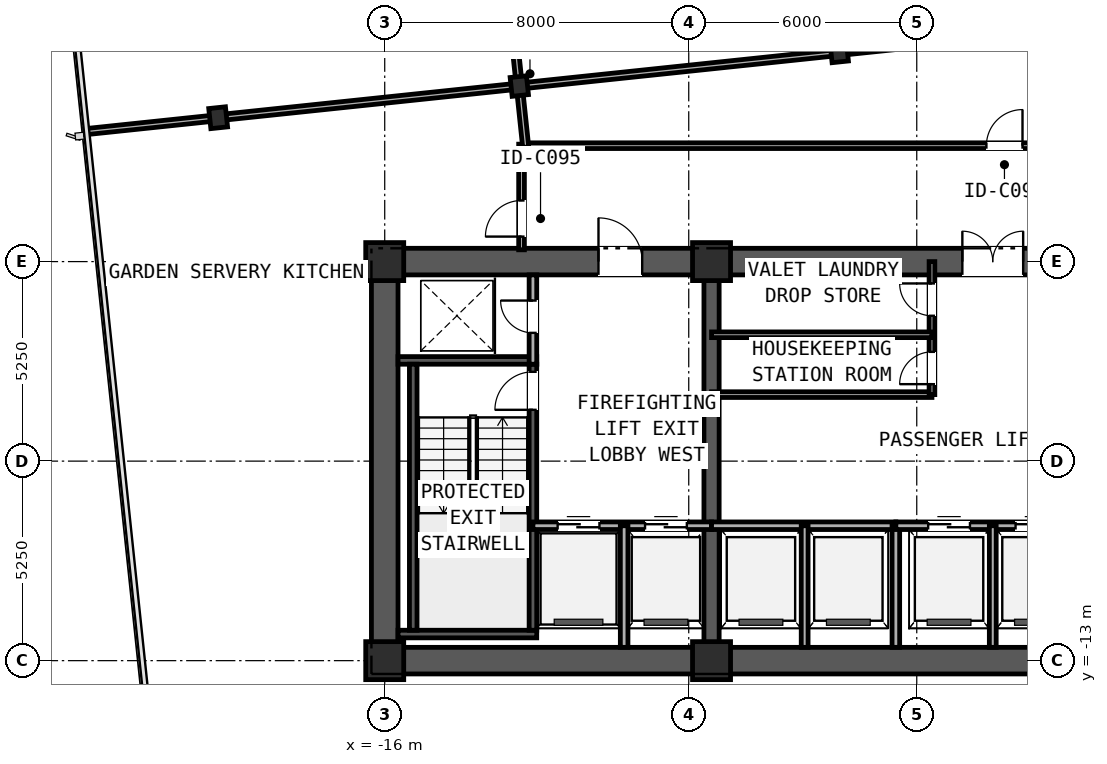
"""IFC4 building model, lengths in metres.
Left out: names, types, materials, properties, quantities, classifications, styles, units other than length and angle.
Written with IfcOpenShell. Run it as: python <this file> out.ifc"""

import sys

from ifc_helpers import new_model, si_unit, direction, frame, frame_2d, origin, origin_2d, place, context, subcontext, project, spatial, rectangle, i_section, extrude, element, fill, save


model = new_model("IFC4")
c1 = context("Model", 3, precision=1e-05, world=origin(), true_north=direction((0.0, 1.0)))
c2 = subcontext(c1, "Body", "Model", "MODEL_VIEW")
j1 = project(units=[si_unit("LENGTHUNIT", "METRE"), si_unit("PLANEANGLEUNIT", "RADIAN")], contexts=[c1])
p1 = place(None, origin())
s1 = spatial("IfcSite", under=j1, at=p1, CompositionType="ELEMENT")
p2 = place(p1, origin())
s2 = spatial("IfcBuilding", under=s1, at=p2, CompositionType="ELEMENT")
p3 = place(p2, frame((0.0, 0.0, 106.35)))
s3 = spatial("IfcBuildingStorey", under=s2, at=p3, CompositionType="ELEMENT", Elevation=106.35)
p4 = place(p3, frame((-16.35, -13.0, 0.0), z_axis=(0.0, 0.0, 1.0), x_axis=(1.0, 0.0, 0.0)))
e1 = element("IfcWall", 1, at=p4, inside=s3, PredefinedType="SHEAR", context=c2, shape_type="SweptSolid", body=[
    extrude(rectangle(XDim=32.7, YDim=0.7, at=frame_2d((16.35, 0.0))), origin(), (0.0, 0.0, 1.0), 2.91),
])
p5 = place(p3, frame((-16.35, -2.5, 0.0), z_axis=(0.0, 0.0, 1.0), x_axis=(1.0, 0.0, 0.0)))
e2 = element("IfcWall", 2, at=p5, inside=s3, PredefinedType="SHEAR", context=c2, shape_type="SweptSolid", body=[
    extrude(rectangle(XDim=32.7, YDim=0.7, at=frame_2d((16.35, 0.0))), origin(), (0.0, 0.0, 1.0), 2.91),
])
p6 = place(p5, frame((5.975, 0.0, 0.0)))
e3 = element("IfcOpeningElement", 3, at=p6, cuts=e2, PredefinedType="OPENING", context=c2, shape_type="SweptSolid", body=[
    extrude(rectangle(XDim=1.15, YDim=2.0, at=frame_2d((0.575, 1.0))), frame((0.0, 0.36, 0.0), z_axis=(0.0, -1.0, 0.0), x_axis=(1.0, 0.0, 0.0)), (0.0, 0.0, 1.0), 0.72),
])
p7 = place(p5, frame((15.55, 0.0, 0.0)))
e4 = element("IfcOpeningElement", 4, at=p7, cuts=e2, PredefinedType="OPENING", context=c2, shape_type="SweptSolid", body=[
    extrude(rectangle(XDim=1.6, YDim=2.0, at=frame_2d((0.8, 1.0))), frame((0.0, 0.36, 0.0), z_axis=(0.0, -1.0, 0.0), x_axis=(1.0, 0.0, 0.0)), (0.0, 0.0, 1.0), 0.72),
])
p8 = place(p5, frame((25.575, 0.0, 0.0)))
e5 = element("IfcOpeningElement", 5, at=p8, cuts=e2, PredefinedType="OPENING", context=c2, shape_type="SweptSolid", body=[
    extrude(rectangle(XDim=1.15, YDim=2.0, at=frame_2d((0.575, 1.0))), frame((0.0, 0.36, 0.0), z_axis=(0.0, -1.0, 0.0), x_axis=(1.0, 0.0, 0.0)), (0.0, 0.0, 1.0), 0.72),
])
p9 = place(p3, frame((-16.0, -12.65, 0.0), z_axis=(0.0, 0.0, 1.0), x_axis=(0.0, 1.0, 0.0)))
e6 = element("IfcWall", 6, at=p9, inside=s3, PredefinedType="SHEAR", context=c2, shape_type="SweptSolid", body=[
    extrude(rectangle(XDim=9.8, YDim=0.7, at=frame_2d((4.9, 0.0))), origin(), (0.0, 0.0, 1.0), 2.91),
])
p10 = place(p3, frame((-7.4, -12.65, 0.0), z_axis=(0.0, 0.0, 1.0), x_axis=(0.0, 1.0, 0.0)))
e7 = element("IfcWall", 7, at=p10, inside=s3, PredefinedType="SHEAR", context=c2, shape_type="SweptSolid", body=[
    extrude(rectangle(XDim=9.8, YDim=0.4, at=frame_2d((4.9, 0.0))), origin(), (0.0, 0.0, 1.0), 3.19),
])
for number, where, z_axis, x_axis in (
    (8, (-15.65, -12.3, 0.0), (0.0, 0.0, 1.0), (1.0, 0.0, 0.0)),
    (9, (-15.65, -5.1, 0.0), (0.0, 0.0, 1.0), (1.0, 0.0, 0.0)),
):
    element("IfcWall", number, at=place(p3, frame(where, z_axis=z_axis, x_axis=x_axis)), inside=s3, PredefinedType="SOLIDWALL", context=c2, shape_type="SweptSolid", body=[
        extrude(rectangle(XDim=3.65, YDim=0.2, at=frame_2d((1.825, 0.0))), origin(), (0.0, 0.0, 1.0), 3.19),
    ])
p11 = place(p3, frame((-15.25, -12.2, 0.0), z_axis=(0.0, 0.0, 1.0), x_axis=(0.0, 1.0, 0.0)))
e10 = element("IfcWall", 10, at=p11, inside=s3, PredefinedType="SOLIDWALL", context=c2, shape_type="SweptSolid", body=[
    extrude(rectangle(XDim=7.0, YDim=0.2, at=frame_2d((3.5, 0.0))), origin(), (0.0, 0.0, 1.0), 3.19),
])
p12 = place(p3, frame((-12.1, -12.2, 0.0), z_axis=(0.0, 0.0, 1.0), x_axis=(0.0, 1.0, 0.0)))
e11 = element("IfcWall", 11, at=p12, inside=s3, PredefinedType="SOLIDWALL", context=c2, shape_type="SweptSolid", body=[
    extrude(rectangle(XDim=7.0, YDim=0.2, at=frame_2d((3.5, 0.0))), origin(), (0.0, 0.0, 1.0), 3.19),
])
p13 = place(p12, frame((5.8, 0.0, 0.0)))
e12 = element("IfcOpeningElement", 12, at=p13, cuts=e11, PredefinedType="OPENING", context=c2, shape_type="SweptSolid", body=[
    extrude(rectangle(XDim=1.0, YDim=2.1, at=frame_2d((0.5, 1.05))), frame((0.0, 0.11, 0.0), z_axis=(0.0, -1.0, 0.0), x_axis=(1.0, 0.0, 0.0)), (0.0, 0.0, 1.0), 0.22),
])
for number, where, z_axis, x_axis in (
    (13, (-16.0, -13.0, 0.0), (0.0, 0.0, 1.0), (1.0, 0.0, 0.0)),
    (14, (-7.4, -13.0, 0.0), (0.0, 0.0, 1.0), (1.0, 0.0, 0.0)),
    (15, (-16.0, -2.5, 0.0), (0.0, 0.0, 1.0), (1.0, 0.0, 0.0)),
    (16, (-7.4, -2.5, 0.0), (0.0, 0.0, 1.0), (1.0, 0.0, 0.0)),
):
    element("IfcColumn", number, at=place(p3, frame(where, z_axis=z_axis, x_axis=x_axis)), inside=s3, PredefinedType="COLUMN", context=c2, shape_type="SweptSolid", body=[
        extrude(rectangle(XDim=1.0, YDim=1.0, at=origin_2d()), origin(), (0.0, 0.0, 1.0), 3.45),
    ])
p14 = place(p3, frame((-20.383, 1.286, 0.0), z_axis=(0.0, 0.0, 1.0), x_axis=(0.994521895368, 0.104528463268, 0.0)))
e17 = element("IfcColumn", 17, at=p14, inside=s3, PredefinedType="COLUMN", context=c2, shape_type="SweptSolid", body=[
    extrude(i_section(OverallWidth=0.442, OverallDepth=0.531, WebThickness=0.066, FlangeThickness=0.106, FilletRadius=0.031, at=origin_2d()), origin(), (0.0, 0.0, 1.0), 3.45),
])
for number, where, z_axis, x_axis in (
    (18, (-12.459, 2.119, 0.0), (0.0, 0.0, 1.0), (0.995, 0.105, 0.0)),
    (19, (-4.039, 3.004, 0.0), (0.0, 0.0, 1.0), (0.995, 0.105, 0.0)),
):
    element("IfcColumn", number, at=place(p3, frame(where, z_axis=z_axis, x_axis=x_axis)), inside=s3, PredefinedType="COLUMN", context=c2, shape_type="SweptSolid", body=[
        extrude(i_section(OverallWidth=0.432, OverallDepth=0.498, WebThickness=0.056, FlangeThickness=0.089, FilletRadius=0.031, at=origin_2d()), origin(), (0.0, 0.0, 1.0), 3.45),
    ])
p15 = place(p3, frame((-12.1, -5.2, 0.0), z_axis=(0.0, 0.0, 1.0), x_axis=(0.0, 1.0, 0.0)))
e20 = element("IfcWall", 20, at=p15, inside=s3, PredefinedType="PARTITIONING", context=c2, shape_type="SweptSolid", body=[
    extrude(rectangle(XDim=2.35, YDim=0.2, at=frame_2d((1.175, 0.0))), origin(), (0.0, 0.0, 1.0), 2.225),
])
p16 = place(p15, frame((0.825, 0.0, 0.0)))
e21 = element("IfcOpeningElement", 21, at=p16, cuts=e20, PredefinedType="OPENING", context=c2, shape_type="SweptSolid", body=[
    extrude(rectangle(XDim=0.85, YDim=2.05, at=frame_2d((0.425, 1.025))), frame((0.0, 0.11, 0.0), z_axis=(0.0, -1.0, 0.0), x_axis=(1.0, 0.0, 0.0)), (0.0, 0.0, 1.0), 0.22),
])
p17 = place(p3, frame((-12.1, -9.45, 0.0), z_axis=(0.0, 0.0, 1.0), x_axis=(1.0, 0.0, 0.0)))
e22 = element("IfcWall", 22, at=p17, inside=s3, PredefinedType="PARTITIONING", context=c2, shape_type="SweptSolid", body=[
    extrude(rectangle(XDim=4.7, YDim=0.2, at=frame_2d((2.35, 0.0))), origin(), (0.0, 0.0, 1.0), 3.19),
])
p18 = place(p17, frame((0.65, 0.0, 0.0)))
e23 = element("IfcOpeningElement", 23, at=p18, cuts=e22, PredefinedType="OPENING", context=c2, shape_type="SweptSolid", body=[
    extrude(rectangle(XDim=1.1, YDim=2.2, at=frame_2d((0.55, 1.1))), frame((0.0, 0.11, 0.0), z_axis=(0.0, -1.0, 0.0), x_axis=(1.0, 0.0, 0.0)), (0.0, 0.0, 1.0), 0.22),
])
p19 = place(p17, frame((2.95, 0.0, 0.0)))
e24 = element("IfcOpeningElement", 24, at=p19, cuts=e22, PredefinedType="OPENING", context=c2, shape_type="SweptSolid", body=[
    extrude(rectangle(XDim=1.1, YDim=2.2, at=frame_2d((0.55, 1.1))), frame((0.0, 0.11, 0.0), z_axis=(0.0, -1.0, 0.0), x_axis=(1.0, 0.0, 0.0)), (0.0, 0.0, 1.0), 0.22),
])
p20 = place(p3, frame((-9.7, -12.65, 0.0), z_axis=(0.0, 0.0, 1.0), x_axis=(0.0, 1.0, 0.0)))
e25 = element("IfcWall", 25, at=p20, inside=s3, PredefinedType="PARTITIONING", context=c2, shape_type="SweptSolid", body=[
    extrude(rectangle(XDim=3.2, YDim=0.2, at=frame_2d((1.6, 0.0))), origin(), (0.0, 0.0, 1.0), 2.225),
])
p21 = place(p3, frame((-7.4, -9.45, 0.0), z_axis=(0.0, 0.0, 1.0), x_axis=(1.0, 0.0, 0.0)))
e26 = element("IfcWall", 26, at=p21, inside=s3, PredefinedType="PARTITIONING", context=c2, shape_type="SweptSolid", body=[
    extrude(rectangle(XDim=4.85, YDim=0.2, at=frame_2d((2.425, 0.0))), origin(), (0.0, 0.0, 1.0), 3.19),
])
p22 = place(p3, frame((-4.95, -12.65, 0.0), z_axis=(0.0, 0.0, 1.0), x_axis=(0.0, 1.0, 0.0)))
e27 = element("IfcWall", 27, at=p22, inside=s3, PredefinedType="PARTITIONING", context=c2, shape_type="SweptSolid", body=[
    extrude(rectangle(XDim=3.2, YDim=0.18, at=frame_2d((1.6, 0.0))), origin(), (0.0, 0.0, 1.0), 2.225),
])
p23 = place(p3, frame((-2.55, -12.65, 0.0), z_axis=(0.0, 0.0, 1.0), x_axis=(0.0, 1.0, 0.0)))
e28 = element("IfcWall", 28, at=p23, inside=s3, PredefinedType="PARTITIONING", context=c2, shape_type="SweptSolid", body=[
    extrude(rectangle(XDim=3.2, YDim=0.2, at=frame_2d((1.6, 0.0))), origin(), (0.0, 0.0, 1.0), 2.225),
])
p24 = place(p3, frame((-2.55, -9.45, 0.0), z_axis=(0.0, 0.0, 1.0), x_axis=(1.0, 0.0, 0.0)))
e29 = element("IfcWall", 29, at=p24, inside=s3, PredefinedType="PARTITIONING", context=c2, shape_type="SweptSolid", body=[
    extrude(rectangle(XDim=5.1, YDim=0.2, at=frame_2d((2.55, 0.0))), origin(), (0.0, 0.0, 1.0), 3.19),
])
p25 = place(p24, frame((0.85, 0.0, 0.0)))
e30 = element("IfcOpeningElement", 30, at=p25, cuts=e29, PredefinedType="OPENING", context=c2, shape_type="SweptSolid", body=[
    extrude(rectangle(XDim=1.1, YDim=2.2, at=frame_2d((0.55, 1.1))), frame((0.0, 0.11, 0.0), z_axis=(0.0, -1.0, 0.0), x_axis=(1.0, 0.0, 0.0)), (0.0, 0.0, 1.0), 0.22),
])
p26 = place(p24, frame((3.15, 0.0, 0.0)))
e31 = element("IfcOpeningElement", 31, at=p26, cuts=e29, PredefinedType="OPENING", context=c2, shape_type="SweptSolid", body=[
    extrude(rectangle(XDim=1.1, YDim=2.2, at=frame_2d((0.55, 1.1))), frame((0.0, 0.11, 0.0), z_axis=(0.0, -1.0, 0.0), x_axis=(1.0, 0.0, 0.0)), (0.0, 0.0, 1.0), 0.22),
])
p27 = place(p3, frame((0.0, -12.65, 0.0), z_axis=(0.0, 0.0, 1.0), x_axis=(0.0, 1.0, 0.0)))
e32 = element("IfcWall", 32, at=p27, inside=s3, PredefinedType="PARTITIONING", context=c2, shape_type="SweptSolid", body=[
    extrude(rectangle(XDim=3.2, YDim=0.18, at=frame_2d((1.6, 0.0))), origin(), (0.0, 0.0, 1.0), 2.225),
])
p28 = place(p3, frame((-7.4, -6.0, 0.0), z_axis=(0.0, 0.0, 1.0), x_axis=(1.0, 0.0, 0.0)))
e33 = element("IfcWall", 33, at=p28, inside=s3, PredefinedType="PARTITIONING", context=c2, shape_type="SweptSolid", body=[
    extrude(rectangle(XDim=5.8, YDim=0.15, at=frame_2d((2.9, 0.0))), origin(), (0.0, 0.0, 1.0), 3.19),
])
p29 = place(p3, frame((-1.6, -6.0, 0.0), z_axis=(0.0, 0.0, 1.0), x_axis=(0.0, 1.0, 0.0)))
e34 = element("IfcWall", 34, at=p29, inside=s3, PredefinedType="PARTITIONING", context=c2, shape_type="SweptSolid", body=[
    extrude(rectangle(XDim=3.5, YDim=0.15, at=frame_2d((1.75, 0.0))), origin(), (0.0, 0.0, 1.0), 2.225),
])
p30 = place(p29, frame((0.275, 0.0, 0.0)))
e35 = element("IfcOpeningElement", 35, at=p30, cuts=e34, PredefinedType="OPENING", context=c2, shape_type="SweptSolid", body=[
    extrude(rectangle(XDim=0.85, YDim=2.05, at=frame_2d((0.425, 1.025))), frame((0.0, 0.085, 0.0), z_axis=(0.0, -1.0, 0.0), x_axis=(1.0, 0.0, 0.0)), (0.0, 0.0, 1.0), 0.17),
])
p31 = place(p29, frame((2.075, 0.0, 0.0)))
e36 = element("IfcOpeningElement", 36, at=p31, cuts=e34, PredefinedType="OPENING", context=c2, shape_type="SweptSolid", body=[
    extrude(rectangle(XDim=0.85, YDim=2.05, at=frame_2d((0.425, 1.025))), frame((0.0, 0.085, 0.0), z_axis=(0.0, -1.0, 0.0), x_axis=(1.0, 0.0, 0.0)), (0.0, 0.0, 1.0), 0.17),
])
p32 = place(p3, frame((-7.4, -4.425, 0.0), z_axis=(0.0, 0.0, 1.0), x_axis=(1.0, 0.0, 0.0)))
e37 = element("IfcWall", 37, at=p32, inside=s3, PredefinedType="PARTITIONING", context=c2, shape_type="SweptSolid", body=[
    extrude(rectangle(XDim=5.8, YDim=0.15, at=frame_2d((2.9, 0.0))), origin(), (0.0, 0.0, 1.0), 3.19),
])
p33 = place(p3, frame((-12.376, 0.55, 0.0), z_axis=(0.0, 0.0, 1.0), x_axis=(1.0, 0.0, 0.0)))
e38 = element("IfcWall", 38, at=p33, inside=s3, PredefinedType="PARTITIONING", context=c2, shape_type="SweptSolid", body=[
    extrude(rectangle(XDim=20.278, YDim=0.15, at=frame_2d((10.139, 0.0))), origin(), (0.0, 0.0, 1.0), 2.479),
])
p34 = place(p33, frame((12.209, 0.0, 0.0)))
e39 = element("IfcOpeningElement", 39, at=p34, cuts=e38, PredefinedType="OPENING", context=c2, shape_type="SweptSolid", body=[
    extrude(rectangle(XDim=0.95, YDim=2.15, at=frame_2d((0.475, 1.075))), frame((0.0, 0.085, 0.0), z_axis=(0.0, -1.0, 0.0), x_axis=(1.0, 0.0, 0.0)), (0.0, 0.0, 1.0), 0.17),
])
p35 = place(p3, frame((-12.4, -2.19, 0.0), z_axis=(0.0, 0.0, 1.0), x_axis=(0.0, 1.0, 0.0)))
e40 = element("IfcWall", 40, at=p35, inside=s3, PredefinedType="PARTITIONING", context=c2, shape_type="SweptSolid", body=[
    extrude(rectangle(XDim=2.78, YDim=0.15, at=frame_2d((1.39, 0.0))), origin(), (0.0, 0.0, 1.0), 2.225),
])
p36 = place(p35, frame((0.348, 0.0, 0.0)))
e41 = element("IfcOpeningElement", 41, at=p36, cuts=e40, PredefinedType="OPENING", context=c2, shape_type="SweptSolid", body=[
    extrude(rectangle(XDim=0.95, YDim=2.15, at=frame_2d((0.475, 1.075))), frame((0.0, 0.085, 0.0), z_axis=(0.0, -1.0, 0.0), x_axis=(1.0, 0.0, 0.0)), (0.0, 0.0, 1.0), 0.17),
])
p37 = place(p3, frame((-12.719, 4.595, 0.0), z_axis=(0.0, 0.0, 1.0), x_axis=(0.104569435529, -0.994517588157, 0.0)))
e42 = element("IfcWall", 42, at=p37, inside=s3, PredefinedType="PARTITIONING", context=c2, shape_type="SweptSolid", body=[
    extrude(rectangle(XDim=2.314, YDim=0.16, at=frame_2d((1.157, 0.0))), origin(), (0.0, 0.0, 1.0), 2.479),
])
p38 = place(p3, frame((-20.558, 1.267, 0.0), z_axis=(0.0, 0.0, 1.0), x_axis=(-0.99451904707, -0.10455555946, 0.0)))
e43 = element("IfcWall", 43, at=p38, inside=s3, PredefinedType="PARTITIONING", context=c2, shape_type="SweptSolid", body=[
    extrude(rectangle(XDim=3.344, YDim=0.16, at=frame_2d((1.672, 0.0))), origin(), (0.0, 0.0, 1.0), 3.19),
])
p39 = place(p3, frame((-12.634, 2.1, 0.0), z_axis=(0.0, 0.0, 1.0), x_axis=(-0.994524056968, -0.104507894972, 0.0)))
e44 = element("IfcWall", 44, at=p39, inside=s3, PredefinedType="PARTITIONING", context=c2, shape_type="SweptSolid", body=[
    extrude(rectangle(XDim=7.616, YDim=0.16, at=frame_2d((3.808, 0.0))), origin(), (0.0, 0.0, 1.0), 2.479),
])
p40 = place(p3, frame((-4.214, 2.985, 0.0), z_axis=(0.0, 0.0, 1.0), x_axis=(-0.994521269983, -0.104534413238, 0.0)))
e45 = element("IfcWall", 45, at=p40, inside=s3, PredefinedType="PARTITIONING", context=c2, shape_type="SweptSolid", body=[
    extrude(rectangle(XDim=8.114, YDim=0.16, at=frame_2d((4.057, 0.0))), origin(), (0.0, 0.0, 1.0), 2.479),
])
p41 = place(p3, frame((4.205, 3.87, 0.0), z_axis=(0.0, 0.0, 1.0), x_axis=(-0.994521598781, -0.104531285071, 0.0)))
e46 = element("IfcWall", 46, at=p41, inside=s3, PredefinedType="PARTITIONING", context=c2, shape_type="SweptSolid", body=[
    extrude(rectangle(XDim=8.114, YDim=0.16, at=frame_2d((4.057, 0.0))), origin(), (0.0, 0.0, 1.0), 2.479),
])
p42 = place(p3, frame((-12.29, 0.51, 0.0), z_axis=(0.0, 0.0, 1.0), x_axis=(-0.104534854339, 0.994521223619, 0.0)))
e47 = element("IfcWall", 47, at=p42, inside=s3, PredefinedType="PARTITIONING", context=c2, shape_type="SweptSolid", body=[
    extrude(rectangle(XDim=1.441, YDim=0.16, at=frame_2d((0.72, 0.0))), origin(), (0.0, 0.0, 1.0), 2.479),
])
p43 = place(p13, frame((1.0, 0.0, 0.0), z_axis=(0.0, 0.0, 1.0), x_axis=(-1.0, 0.0, 0.0)))
e48 = element("IfcDoor", 48, at=p43, inside=s3, OperationType="SINGLE_SWING_LEFT", PredefinedType="DOOR", context=c2, shape_type="SweptSolid", body=[
    extrude(rectangle(XDim=1.0, YDim=2.1, at=frame_2d((0.5, 1.05))), frame((0.0, 0.025, 0.0), z_axis=(0.0, -1.0, 0.0), x_axis=(1.0, 0.0, 0.0)), (0.0, 0.0, 1.0), 0.05),
])
fill(e12, e48)
p44 = place(p16, origin())
e49 = element("IfcDoor", 49, at=p44, inside=s3, OperationType="SINGLE_SWING_RIGHT", PredefinedType="DOOR", context=c2, shape_type="SweptSolid", body=[
    extrude(rectangle(XDim=0.85, YDim=2.05, at=frame_2d((0.425, 1.025))), frame((0.0, 0.025, 0.0), z_axis=(0.0, -1.0, 0.0), x_axis=(1.0, 0.0, 0.0)), (0.0, 0.0, 1.0), 0.05),
])
fill(e21, e49)
p45 = place(p18, origin())
e50 = element("IfcDoor", 50, at=p45, inside=s3, OperationType="SLIDING_TO_LEFT", PredefinedType="DOOR", context=c2, shape_type="SweptSolid", body=[
    extrude(rectangle(XDim=1.1, YDim=2.2, at=frame_2d((0.55, 1.1))), frame((0.0, 0.025, 0.0), z_axis=(0.0, -1.0, 0.0), x_axis=(1.0, 0.0, 0.0)), (0.0, 0.0, 1.0), 0.05),
])
fill(e23, e50)
p46 = place(p19, origin())
e51 = element("IfcDoor", 51, at=p46, inside=s3, OperationType="SLIDING_TO_RIGHT", PredefinedType="DOOR", context=c2, shape_type="SweptSolid", body=[
    extrude(rectangle(XDim=1.1, YDim=2.2, at=frame_2d((0.55, 1.1))), frame((0.0, 0.025, 0.0), z_axis=(0.0, -1.0, 0.0), x_axis=(1.0, 0.0, 0.0)), (0.0, 0.0, 1.0), 0.05),
])
fill(e24, e51)
p47 = place(p6, origin())
e52 = element("IfcDoor", 52, at=p47, inside=s3, OperationType="SINGLE_SWING_LEFT", PredefinedType="DOOR", context=c2, shape_type="SweptSolid", body=[
    extrude(rectangle(XDim=1.15, YDim=2.0, at=frame_2d((0.575, 1.0))), frame((0.0, 0.025, 0.0), z_axis=(0.0, -1.0, 0.0), x_axis=(1.0, 0.0, 0.0)), (0.0, 0.0, 1.0), 0.05),
])
fill(e3, e52)
p48 = place(p7, origin())
e53 = element("IfcDoor", 53, at=p48, inside=s3, OperationType="DOUBLE_DOOR_SINGLE_SWING", PredefinedType="DOOR", context=c2, shape_type="SweptSolid", body=[
    extrude(rectangle(XDim=1.6, YDim=2.0, at=frame_2d((0.8, 1.0))), frame((0.0, 0.025, 0.0), z_axis=(0.0, -1.0, 0.0), x_axis=(1.0, 0.0, 0.0)), (0.0, 0.0, 1.0), 0.05),
])
fill(e4, e53)
p49 = place(p25, origin())
e54 = element("IfcDoor", 54, at=p49, inside=s3, OperationType="SLIDING_TO_RIGHT", PredefinedType="DOOR", context=c2, shape_type="SweptSolid", body=[
    extrude(rectangle(XDim=1.1, YDim=2.2, at=frame_2d((0.55, 1.1))), frame((0.0, 0.025, 0.0), z_axis=(0.0, -1.0, 0.0), x_axis=(1.0, 0.0, 0.0)), (0.0, 0.0, 1.0), 0.05),
])
fill(e30, e54)
p50 = place(p26, origin())
e55 = element("IfcDoor", 55, at=p50, inside=s3, OperationType="SLIDING_TO_RIGHT", PredefinedType="DOOR", context=c2, shape_type="SweptSolid", body=[
    extrude(rectangle(XDim=1.1, YDim=2.2, at=frame_2d((0.55, 1.1))), frame((0.0, 0.025, 0.0), z_axis=(0.0, -1.0, 0.0), x_axis=(1.0, 0.0, 0.0)), (0.0, 0.0, 1.0), 0.05),
])
fill(e31, e55)
p51 = place(p30, origin())
e56 = element("IfcDoor", 56, at=p51, inside=s3, OperationType="SINGLE_SWING_LEFT", PredefinedType="DOOR", context=c2, shape_type="SweptSolid", body=[
    extrude(rectangle(XDim=0.85, YDim=2.05, at=frame_2d((0.425, 1.025))), frame((0.0, 0.025, 0.0), z_axis=(0.0, -1.0, 0.0), x_axis=(1.0, 0.0, 0.0)), (0.0, 0.0, 1.0), 0.05),
])
fill(e35, e56)
p52 = place(p31, origin())
e57 = element("IfcDoor", 57, at=p52, inside=s3, OperationType="SINGLE_SWING_RIGHT", PredefinedType="DOOR", context=c2, shape_type="SweptSolid", body=[
    extrude(rectangle(XDim=0.85, YDim=2.05, at=frame_2d((0.425, 1.025))), frame((0.0, 0.025, 0.0), z_axis=(0.0, -1.0, 0.0), x_axis=(1.0, 0.0, 0.0)), (0.0, 0.0, 1.0), 0.05),
])
fill(e36, e57)
p53 = place(p34, frame((0.95, 0.0, 0.0), z_axis=(0.0, 0.0, 1.0), x_axis=(-1.0, 0.0, 0.0)))
e58 = element("IfcDoor", 58, at=p53, inside=s3, OperationType="SINGLE_SWING_RIGHT", PredefinedType="DOOR", context=c2, shape_type="SweptSolid", body=[
    extrude(rectangle(XDim=0.95, YDim=2.15, at=frame_2d((0.475, 1.075))), frame((0.0, 0.025, 0.0), z_axis=(0.0, -1.0, 0.0), x_axis=(1.0, 0.0, 0.0)), (0.0, 0.0, 1.0), 0.05),
])
fill(e39, e58)
p54 = place(p36, frame((0.95, 0.0, 0.0), z_axis=(0.0, 0.0, 1.0), x_axis=(-1.0, 0.0, 0.0)))
e59 = element("IfcDoor", 59, at=p54, inside=s3, OperationType="SINGLE_SWING_LEFT", PredefinedType="DOOR", context=c2, shape_type="SweptSolid", body=[
    extrude(rectangle(XDim=0.95, YDim=2.15, at=frame_2d((0.475, 1.075))), frame((0.0, 0.025, 0.0), z_axis=(0.0, -1.0, 0.0), x_axis=(1.0, 0.0, 0.0)), (0.0, 0.0, 1.0), 0.05),
])
fill(e41, e59)
save(model, sys.argv[1])
